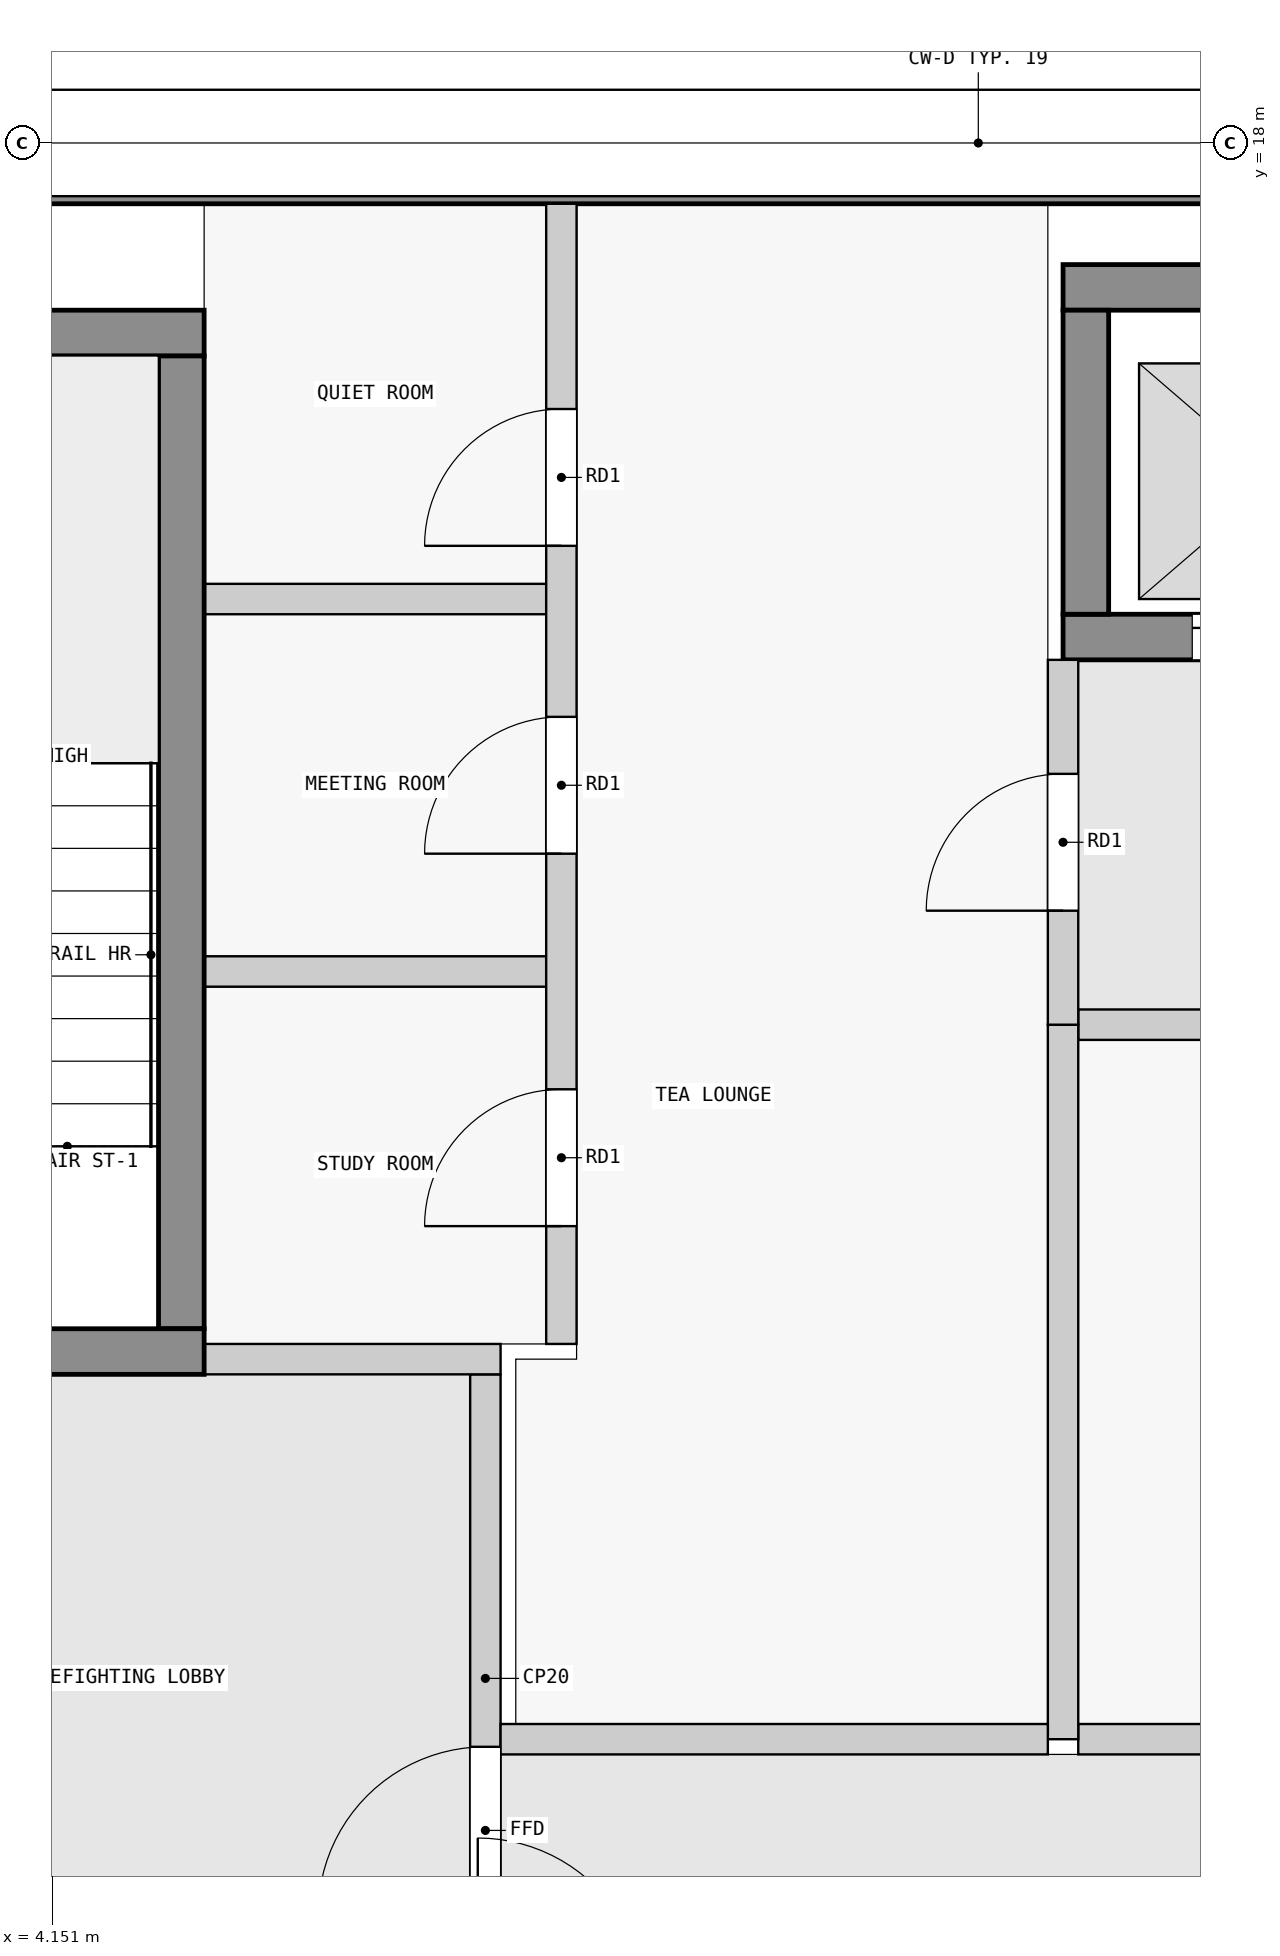
"""IFC4 building model, lengths in metres.
Left out: names, types, materials, properties, quantities, classifications, styles, units other than length and angle.
Written with IfcOpenShell. Run it as: python <this file> out.ifc"""

import sys

from ifc_helpers import new_model, si_unit, direction, frame, frame_2d, origin, place, context, subcontext, project, spatial, rectangle, extrude, element, fill, save


model = new_model("IFC4")
c1 = context("Model", 3, precision=1e-05, world=origin(), true_north=direction((0.0, 1.0)))
c2 = subcontext(c1, "Body", "Model", "MODEL_VIEW")
j1 = project(units=[si_unit("LENGTHUNIT", "METRE"), si_unit("PLANEANGLEUNIT", "RADIAN")], contexts=[c1])
p1 = place(None, origin())
s1 = spatial("IfcSite", under=j1, at=p1, CompositionType="ELEMENT")
p2 = place(p1, origin())
s2 = spatial("IfcBuilding", under=s1, at=p2, CompositionType="ELEMENT")
p3 = place(p2, frame((0.0, 0.0, 305.4)))
s3 = spatial("IfcBuildingStorey", under=s2, at=p3, CompositionType="ELEMENT", Elevation=305.4)
p4 = place(p3, frame((1.9, 17.8, 0.0), z_axis=(0.0, 0.0, 1.0), x_axis=(1.0, 0.0, 0.0)))
e1 = element("IfcWall", 1, at=p4, inside=s3, PredefinedType="SHEAR", context=c2, shape_type="SweptSolid", body=[
    extrude(rectangle(XDim=20.6, YDim=0.4, at=frame_2d((10.3, 0.0))), origin(), (0.0, 0.0, 1.0), 3.25),
])
p5 = place(p3, frame((2.3, 10.05, 0.0), z_axis=(0.0, 0.0, 1.0), x_axis=(1.0, 0.0, 0.0)))
e2 = element("IfcWall", 2, at=p5, inside=s3, PredefinedType="SHEAR", context=c2, shape_type="SweptSolid", body=[
    extrude(rectangle(XDim=2.85, YDim=0.3, at=frame_2d((1.425, 0.0))), origin(), (0.0, 0.0, 1.0), 3.25),
])
p6 = place(p5, frame((0.25, 0.0, 0.0)))
e3 = element("IfcOpeningElement", 3, at=p6, cuts=e2, PredefinedType="OPENING", context=c2, shape_type="SweptSolid", body=[
    extrude(rectangle(XDim=1.1, YDim=2.1, at=frame_2d((0.55, 1.05))), frame((0.0, 0.16, 0.0), z_axis=(0.0, -1.0, 0.0), x_axis=(1.0, 0.0, 0.0)), (0.0, 0.0, 1.0), 0.32),
])
p7 = place(p3, frame((5.0, 10.2, 0.0), z_axis=(0.0, 0.0, 1.0), x_axis=(0.0, 1.0, 0.0)))
e4 = element("IfcWall", 4, at=p7, inside=s3, PredefinedType="SHEAR", context=c2, shape_type="SweptSolid", body=[
    extrude(rectangle(XDim=6.4, YDim=0.3, at=frame_2d((3.2, 0.0))), origin(), (0.0, 0.0, 1.0), 3.25),
])
p8 = place(p3, frame((2.3, 16.75, 0.0), z_axis=(0.0, 0.0, 1.0), x_axis=(1.0, 0.0, 0.0)))
e5 = element("IfcWall", 5, at=p8, inside=s3, PredefinedType="SHEAR", context=c2, shape_type="SweptSolid", body=[
    extrude(rectangle(XDim=2.85, YDim=0.3, at=frame_2d((1.425, 0.0))), origin(), (0.0, 0.0, 1.0), 3.25),
])
p9 = place(p3, frame((10.8, 17.05, 0.0), z_axis=(0.0, 0.0, 1.0), x_axis=(1.0, 0.0, 0.0)))
e6 = element("IfcWall", 6, at=p9, inside=s3, PredefinedType="SHEAR", context=c2, shape_type="SweptSolid", body=[
    extrude(rectangle(XDim=7.8, YDim=0.3, at=frame_2d((3.9, 0.0))), origin(), (0.0, 0.0, 1.0), 3.25),
])
p10 = place(p3, frame((10.8, 14.75, 0.0), z_axis=(0.0, 0.0, 1.0), x_axis=(1.0, 0.0, 0.0)))
e7 = element("IfcWall", 7, at=p10, inside=s3, PredefinedType="SHEAR", context=c2, shape_type="SweptSolid", body=[
    extrude(rectangle(XDim=7.8, YDim=0.3, at=frame_2d((3.9, 0.0))), origin(), (0.0, 0.0, 1.0), 3.25),
])
p11 = place(p10, frame((0.85, 0.0, 0.0)))
e8 = element("IfcOpeningElement", 8, at=p11, cuts=e7, PredefinedType="OPENING", context=c2, shape_type="SweptSolid", body=[
    extrude(rectangle(XDim=1.1, YDim=2.1, at=frame_2d((0.55, 1.05))), frame((0.0, 0.16, 0.0), z_axis=(0.0, -1.0, 0.0), x_axis=(1.0, 0.0, 0.0)), (0.0, 0.0, 1.0), 0.32),
])
p12 = place(p10, frame((3.35, 0.0, 0.0)))
e9 = element("IfcOpeningElement", 9, at=p12, cuts=e7, PredefinedType="OPENING", context=c2, shape_type="SweptSolid", body=[
    extrude(rectangle(XDim=1.1, YDim=2.1, at=frame_2d((0.55, 1.05))), frame((0.0, 0.16, 0.0), z_axis=(0.0, -1.0, 0.0), x_axis=(1.0, 0.0, 0.0)), (0.0, 0.0, 1.0), 0.32),
])
p13 = place(p10, frame((5.85, 0.0, 0.0)))
e10 = element("IfcOpeningElement", 10, at=p13, cuts=e7, PredefinedType="OPENING", context=c2, shape_type="SweptSolid", body=[
    extrude(rectangle(XDim=1.1, YDim=2.1, at=frame_2d((0.55, 1.05))), frame((0.0, 0.16, 0.0), z_axis=(0.0, -1.0, 0.0), x_axis=(1.0, 0.0, 0.0)), (0.0, 0.0, 1.0), 0.32),
])
p14 = place(p3, frame((10.95, 14.9, 0.0), z_axis=(0.0, 0.0, 1.0), x_axis=(0.0, 1.0, 0.0)))
e11 = element("IfcWall", 11, at=p14, inside=s3, PredefinedType="SHEAR", context=c2, shape_type="SweptSolid", body=[
    extrude(rectangle(XDim=2.0, YDim=0.3, at=frame_2d((1.0, 0.0))), origin(), (0.0, 0.0, 1.0), 3.25),
])
p15 = place(p3, frame((7.0, 5.9, 0.0), z_axis=(0.0, 0.0, 1.0), x_axis=(0.0, 1.0, 0.0)))
e12 = element("IfcWall", 12, at=p15, inside=s3, PredefinedType="PARTITIONING", context=c2, shape_type="SweptSolid", body=[
    extrude(rectangle(XDim=4.0, YDim=0.2, at=frame_2d((2.0, 0.0))), origin(), (0.0, 0.0, 1.0), 3.25),
])
p16 = place(p15, frame((0.45, 0.0, 0.0)))
e13 = element("IfcOpeningElement", 13, at=p16, cuts=e12, PredefinedType="OPENING", context=c2, shape_type="SweptSolid", body=[
    extrude(rectangle(XDim=1.1, YDim=2.1, at=frame_2d((0.55, 1.05))), frame((0.0, 0.11, 0.0), z_axis=(0.0, -1.0, 0.0), x_axis=(1.0, 0.0, 0.0)), (0.0, 0.0, 1.0), 0.22),
])
p17 = place(p3, frame((5.15, 10.0, 0.0), z_axis=(0.0, 0.0, 1.0), x_axis=(1.0, 0.0, 0.0)))
e14 = element("IfcWall", 14, at=p17, inside=s3, PredefinedType="PARTITIONING", context=c2, shape_type="SweptSolid", body=[
    extrude(rectangle(XDim=1.95, YDim=0.2, at=frame_2d((0.975, 0.0))), origin(), (0.0, 0.0, 1.0), 3.25),
])
p18 = place(p3, frame((7.1, 7.5, 0.0), z_axis=(0.0, 0.0, 1.0), x_axis=(1.0, 0.0, 0.0)))
e15 = element("IfcWall", 15, at=p18, inside=s3, PredefinedType="PARTITIONING", context=c2, shape_type="SweptSolid", body=[
    extrude(rectangle(XDim=3.6, YDim=0.2, at=frame_2d((1.8, 0.0))), origin(), (0.0, 0.0, 1.0), 3.25),
])
p19 = place(p3, frame((10.8, 12.2, 0.0), z_axis=(0.0, 0.0, 1.0), x_axis=(0.0, 1.0, 0.0)))
e16 = element("IfcWall", 16, at=p19, inside=s3, PredefinedType="PARTITIONING", context=c2, shape_type="SweptSolid", body=[
    extrude(rectangle(XDim=2.4, YDim=0.2, at=frame_2d((1.2, 0.0))), origin(), (0.0, 0.0, 1.0), 3.25),
])
p20 = place(p19, frame((0.75, 0.0, 0.0)))
e17 = element("IfcOpeningElement", 17, at=p20, cuts=e16, PredefinedType="OPENING", context=c2, shape_type="SweptSolid", body=[
    extrude(rectangle(XDim=0.9, YDim=2.1, at=frame_2d((0.45, 1.05))), frame((0.0, 0.11, 0.0), z_axis=(0.0, -1.0, 0.0), x_axis=(1.0, 0.0, 0.0)), (0.0, 0.0, 1.0), 0.22),
])
p21 = place(p3, frame((10.8, 7.5, 0.0), z_axis=(0.0, 0.0, 1.0), x_axis=(0.0, 1.0, 0.0)))
e18 = element("IfcWall", 18, at=p21, inside=s3, PredefinedType="PARTITIONING", context=c2, shape_type="SweptSolid", body=[
    extrude(rectangle(XDim=4.7, YDim=0.2, at=frame_2d((2.35, 0.0))), origin(), (0.0, 0.0, 1.0), 3.25),
])
p22 = place(p3, frame((10.9, 7.5, 0.0), z_axis=(0.0, 0.0, 1.0), x_axis=(1.0, 0.0, 0.0)))
e19 = element("IfcWall", 19, at=p22, inside=s3, PredefinedType="PARTITIONING", context=c2, shape_type="SweptSolid", body=[
    extrude(rectangle(XDim=8.7, YDim=0.2, at=frame_2d((4.35, 0.0))), origin(), (0.0, 0.0, 1.0), 3.25),
])
p23 = place(p3, frame((10.9, 12.2, 0.0), z_axis=(0.0, 0.0, 1.0), x_axis=(1.0, 0.0, 0.0)))
e20 = element("IfcWall", 20, at=p23, inside=s3, PredefinedType="PARTITIONING", context=c2, shape_type="SweptSolid", body=[
    extrude(rectangle(XDim=8.7, YDim=0.2, at=frame_2d((4.35, 0.0))), origin(), (0.0, 0.0, 1.0), 3.25),
])
p24 = place(p23, frame((3.9, 0.0, 0.0)))
e21 = element("IfcOpeningElement", 21, at=p24, cuts=e20, PredefinedType="OPENING", context=c2, shape_type="SweptSolid", body=[
    extrude(rectangle(XDim=0.9, YDim=2.1, at=frame_2d((0.45, 1.05))), frame((0.0, 0.11, 0.0), z_axis=(0.0, -1.0, 0.0), x_axis=(1.0, 0.0, 0.0)), (0.0, 0.0, 1.0), 0.22),
])
p25 = place(p3, frame((7.5, 10.1, 0.0), z_axis=(0.0, 0.0, 1.0), x_axis=(0.0, 1.0, 0.0)))
e22 = element("IfcWall", 22, at=p25, inside=s3, PredefinedType="PARTITIONING", context=c2, shape_type="SweptSolid", body=[
    extrude(rectangle(XDim=7.5, YDim=0.2, at=frame_2d((3.75, 0.0))), origin(), (0.0, 0.0, 1.0), 3.25),
])
p26 = place(p25, frame((0.775, 0.0, 0.0)))
e23 = element("IfcOpeningElement", 23, at=p26, cuts=e22, PredefinedType="OPENING", context=c2, shape_type="SweptSolid", body=[
    extrude(rectangle(XDim=0.9, YDim=2.1, at=frame_2d((0.45, 1.05))), frame((0.0, 0.11, 0.0), z_axis=(0.0, -1.0, 0.0), x_axis=(1.0, 0.0, 0.0)), (0.0, 0.0, 1.0), 0.22),
])
p27 = place(p25, frame((3.225, 0.0, 0.0)))
e24 = element("IfcOpeningElement", 24, at=p27, cuts=e22, PredefinedType="OPENING", context=c2, shape_type="SweptSolid", body=[
    extrude(rectangle(XDim=0.9, YDim=2.1, at=frame_2d((0.45, 1.05))), frame((0.0, 0.11, 0.0), z_axis=(0.0, -1.0, 0.0), x_axis=(1.0, 0.0, 0.0)), (0.0, 0.0, 1.0), 0.22),
])
p28 = place(p25, frame((5.25, 0.0, 0.0)))
e25 = element("IfcOpeningElement", 25, at=p28, cuts=e22, PredefinedType="OPENING", context=c2, shape_type="SweptSolid", body=[
    extrude(rectangle(XDim=0.9, YDim=2.1, at=frame_2d((0.45, 1.05))), frame((0.0, 0.11, 0.0), z_axis=(0.0, -1.0, 0.0), x_axis=(1.0, 0.0, 0.0)), (0.0, 0.0, 1.0), 0.22),
])
for number, where, z_axis, x_axis in (
    (26, (5.15, 12.55, 0.0), (0.0, 0.0, 1.0), (1.0, 0.0, 0.0)),
    (27, (5.15, 15.0, 0.0), (0.0, 0.0, 1.0), (1.0, 0.0, 0.0)),
):
    element("IfcWall", number, at=place(p3, frame(where, z_axis=z_axis, x_axis=x_axis)), inside=s3, PredefinedType="PARTITIONING", context=c2, shape_type="SweptSolid", body=[
        extrude(rectangle(XDim=2.25, YDim=0.2, at=frame_2d((1.125, 0.0))), origin(), (0.0, 0.0, 1.0), 3.25),
    ])
p29 = place(p16, origin())
e28 = element("IfcDoor", 28, at=p29, inside=s3, OperationType="SINGLE_SWING_LEFT", PredefinedType="DOOR", context=c2, shape_type="SweptSolid", body=[
    extrude(rectangle(XDim=1.1, YDim=2.1, at=frame_2d((0.55, 1.05))), frame((0.0, 0.025, 0.0), z_axis=(0.0, -1.0, 0.0), x_axis=(1.0, 0.0, 0.0)), (0.0, 0.0, 1.0), 0.05),
])
fill(e13, e28)
p30 = place(p20, origin())
e29 = element("IfcDoor", 29, at=p30, inside=s3, OperationType="SINGLE_SWING_LEFT", PredefinedType="DOOR", context=c2, shape_type="SweptSolid", body=[
    extrude(rectangle(XDim=0.9, YDim=2.1, at=frame_2d((0.45, 1.05))), frame((0.0, 0.025, 0.0), z_axis=(0.0, -1.0, 0.0), x_axis=(1.0, 0.0, 0.0)), (0.0, 0.0, 1.0), 0.05),
])
fill(e17, e29)
p31 = place(p11, origin())
e30 = element("IfcDoor", 30, at=p31, inside=s3, OperationType="DOUBLE_DOOR_SLIDING", PredefinedType="DOOR", context=c2, shape_type="SweptSolid", body=[
    extrude(rectangle(XDim=1.1, YDim=2.1, at=frame_2d((0.55, 1.05))), frame((0.0, 0.025, 0.0), z_axis=(0.0, -1.0, 0.0), x_axis=(1.0, 0.0, 0.0)), (0.0, 0.0, 1.0), 0.05),
])
fill(e8, e30)
p32 = place(p26, origin())
e31 = element("IfcDoor", 31, at=p32, inside=s3, OperationType="SINGLE_SWING_RIGHT", PredefinedType="DOOR", context=c2, shape_type="SweptSolid", body=[
    extrude(rectangle(XDim=0.9, YDim=2.1, at=frame_2d((0.45, 1.05))), frame((0.0, 0.025, 0.0), z_axis=(0.0, -1.0, 0.0), x_axis=(1.0, 0.0, 0.0)), (0.0, 0.0, 1.0), 0.05),
])
fill(e23, e31)
p33 = place(p27, origin())
e32 = element("IfcDoor", 32, at=p33, inside=s3, OperationType="SINGLE_SWING_RIGHT", PredefinedType="DOOR", context=c2, shape_type="SweptSolid", body=[
    extrude(rectangle(XDim=0.9, YDim=2.1, at=frame_2d((0.45, 1.05))), frame((0.0, 0.025, 0.0), z_axis=(0.0, -1.0, 0.0), x_axis=(1.0, 0.0, 0.0)), (0.0, 0.0, 1.0), 0.05),
])
fill(e24, e32)
p34 = place(p28, origin())
e33 = element("IfcDoor", 33, at=p34, inside=s3, OperationType="SINGLE_SWING_RIGHT", PredefinedType="DOOR", context=c2, shape_type="SweptSolid", body=[
    extrude(rectangle(XDim=0.9, YDim=2.1, at=frame_2d((0.45, 1.05))), frame((0.0, 0.025, 0.0), z_axis=(0.0, -1.0, 0.0), x_axis=(1.0, 0.0, 0.0)), (0.0, 0.0, 1.0), 0.05),
])
fill(e25, e33)
save(model, sys.argv[1])
